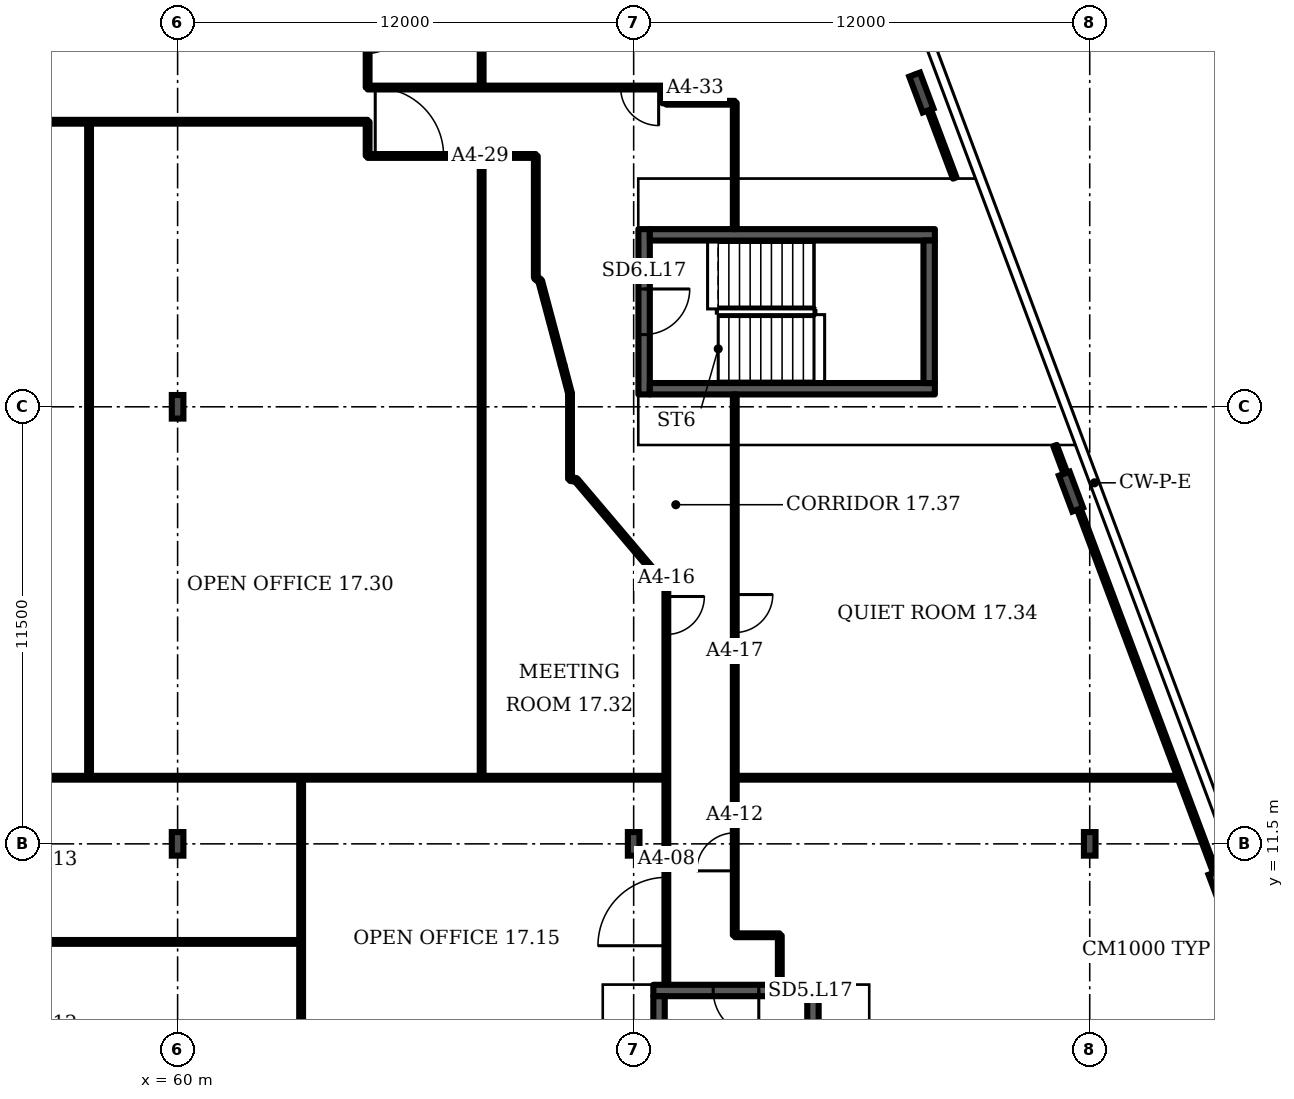
"""IFC4 building model, lengths in metres.
Left out: names, types, materials, properties, quantities, classifications, styles, units other than length and angle.
Written with IfcOpenShell. Run it as: python <this file> out.ifc"""

import sys

from ifc_helpers import new_model, si_unit, direction, frame, frame_2d, origin, origin_2d, place, context, subcontext, project, spatial, rectangle, i_section, extrude, element, fill, save


model = new_model("IFC4")
c1 = context("Model", 3, precision=1e-05, world=origin(), true_north=direction((0.0, 1.0)))
c2 = subcontext(c1, "Body", "Model", "MODEL_VIEW")
j1 = project(units=[si_unit("LENGTHUNIT", "METRE"), si_unit("PLANEANGLEUNIT", "RADIAN")], contexts=[c1])
p1 = place(None, origin())
s1 = spatial("IfcSite", under=j1, at=p1, CompositionType="ELEMENT")
p2 = place(p1, origin())
s2 = spatial("IfcBuilding", under=s1, at=p2, CompositionType="ELEMENT")
p3 = place(p2, frame((0.0, 0.0, 81.1)))
s3 = spatial("IfcBuildingStorey", under=s2, at=p3, CompositionType="ELEMENT", Elevation=81.1)
for number, where, z_axis, x_axis in (
    (1, (87.445, 10.268, 0.0), (0.0, 0.0, 1.0), (0.936, 0.351, 0.0)),
    (2, (83.507, 20.768, 0.0), (0.0, 0.0, 1.0), (0.936, 0.351, 0.0)),
    (3, (79.57, 31.268, 0.0), (0.0, 0.0, 1.0), (0.936, 0.351, 0.0)),
):
    element("IfcColumn", number, at=place(p3, frame(where, z_axis=z_axis, x_axis=x_axis)), inside=s3, PredefinedType="COLUMN", context=c2, shape_type="SweptSolid", body=[
        extrude(i_section(OverallWidth=0.302, OverallDepth=1.008, WebThickness=0.021, FlangeThickness=0.04, FilletRadius=0.03, at=origin_2d()), origin(), (0.0, 0.0, 1.0), 3.6),
    ])
for number, where, z_axis, x_axis in (
    (4, (60.0, 11.5, 0.0), (0.0, 0.0, 1.0), (1.0, 0.0, 0.0)),
    (5, (72.0, 11.5, 0.0), (0.0, 0.0, 1.0), (1.0, 0.0, 0.0)),
    (6, (84.0, 11.5, 0.0), (0.0, 0.0, 1.0), (1.0, 0.0, 0.0)),
    (7, (60.0, 23.0, 0.0), (0.0, 0.0, 1.0), (1.0, 0.0, 0.0)),
):
    element("IfcColumn", number, at=place(p3, frame(where, z_axis=z_axis, x_axis=x_axis)), inside=s3, PredefinedType="COLUMN", context=c2, shape_type="SweptSolid", body=[
        extrude(i_section(OverallWidth=0.305, OverallDepth=0.62, WebThickness=0.021, FlangeThickness=0.04, FilletRadius=0.027, at=origin_2d()), origin(), (0.0, 0.0, 1.0), 3.6),
    ])
p4 = place(p3, frame((72.518, 7.642, 0.0), z_axis=(0.0, 0.0, 1.0), x_axis=(1.0, 0.0, 0.0)))
e8 = element("IfcWall", 8, at=p4, inside=s3, PredefinedType="SHEAR", context=c2, shape_type="SweptSolid", body=[
    extrude(rectangle(XDim=4.35, YDim=0.3, at=frame_2d((2.175, 0.0))), origin(), (0.0, 0.0, 1.0), 3.2),
])
p5 = place(p4, frame((1.575, 0.0, 0.0)))
e9 = element("IfcOpeningElement", 9, at=p5, cuts=e8, PredefinedType="OPENING", context=c2, shape_type="SweptSolid", body=[
    extrude(rectangle(XDim=1.2, YDim=2.1, at=frame_2d((0.6, 1.05))), frame((0.0, 0.16, 0.0), z_axis=(0.0, -1.0, 0.0), x_axis=(1.0, 0.0, 0.0)), (0.0, 0.0, 1.0), 0.32),
])
p6 = place(p3, frame((72.275, 23.325, 0.0), z_axis=(0.0, 0.0, 1.0), x_axis=(0.0, 1.0, 0.0)))
e10 = element("IfcWall", 10, at=p6, inside=s3, PredefinedType="SHEAR", context=c2, shape_type="SweptSolid", body=[
    extrude(rectangle(XDim=4.35, YDim=0.3, at=frame_2d((2.175, 0.0))), origin(), (0.0, 0.0, 1.0), 3.2),
])
p7 = place(p6, frame((1.575, 0.0, 0.0)))
e11 = element("IfcOpeningElement", 11, at=p7, cuts=e10, PredefinedType="OPENING", context=c2, shape_type="SweptSolid", body=[
    extrude(rectangle(XDim=1.2, YDim=2.1, at=frame_2d((0.6, 1.05))), frame((0.0, 0.16, 0.0), z_axis=(0.0, -1.0, 0.0), x_axis=(1.0, 0.0, 0.0)), (0.0, 0.0, 1.0), 0.32),
])
p8 = place(p3, frame((45.3, 8.92, 0.0), z_axis=(0.0, 0.0, 1.0), x_axis=(1.0, 0.0, 0.0)))
e12 = element("IfcWall", 12, at=p8, inside=s3, PredefinedType="PARTITIONING", context=c2, shape_type="SweptSolid", body=[
    extrude(rectangle(XDim=17.95, YDim=0.1, at=frame_2d((8.975, 0.0))), origin(), (0.0, 0.0, 1.0), 3.2),
])
p9 = place(p3, frame((45.3, 13.24, 0.0), z_axis=(0.0, 0.0, 1.0), x_axis=(1.0, 0.0, 0.0)))
e13 = element("IfcWall", 13, at=p9, inside=s3, PredefinedType="PARTITIONING", context=c2, shape_type="SweptSolid", body=[
    extrude(rectangle(XDim=27.56, YDim=0.1, at=frame_2d((13.78, 0.0))), origin(), (0.0, 0.0, 1.0), 3.2),
])
p10 = place(p3, frame((45.3, 30.5, 0.0), z_axis=(0.0, 0.0, 1.0), x_axis=(1.0, 0.0, 0.0)))
e14 = element("IfcWall", 14, at=p10, inside=s3, PredefinedType="PARTITIONING", context=c2, shape_type="SweptSolid", body=[
    extrude(rectangle(XDim=19.7, YDim=0.1, at=frame_2d((9.85, 0.0))), origin(), (0.0, 0.0, 1.0), 3.2),
])
p11 = place(p3, frame((57.67, 13.24, 0.0), z_axis=(0.0, 0.0, 1.0), x_axis=(0.0, 1.0, 0.0)))
e15 = element("IfcWall", 15, at=p11, inside=s3, PredefinedType="PARTITIONING", context=c2, shape_type="SweptSolid", body=[
    extrude(rectangle(XDim=17.26, YDim=0.1, at=frame_2d((8.63, 0.0))), origin(), (0.0, 0.0, 1.0), 3.2),
])
p12 = place(p3, frame((63.25, -2.495, 0.0), z_axis=(0.0, 0.0, 1.0), x_axis=(0.0, 1.0, 0.0)))
e16 = element("IfcWall", 16, at=p12, inside=s3, PredefinedType="PARTITIONING", context=c2, shape_type="SweptSolid", body=[
    extrude(rectangle(XDim=15.735, YDim=0.1, at=frame_2d((7.868, 0.0))), origin(), (0.0, 0.0, 1.0), 2.58),
])
p13 = place(p3, frame((65.0, 29.6, 0.0), z_axis=(0.0, 0.0, 1.0), x_axis=(0.0, 1.0, 0.0)))
e17 = element("IfcWall", 17, at=p13, inside=s3, PredefinedType="PARTITIONING", context=c2, shape_type="SweptSolid", body=[
    extrude(rectangle(XDim=0.9, YDim=0.1, at=frame_2d((0.45, 0.0))), origin(), (0.0, 0.0, 1.0), 3.2),
])
p14 = place(p3, frame((65.0, 29.6, 0.0), z_axis=(0.0, 0.0, 1.0), x_axis=(1.0, 0.0, 0.0)))
e18 = element("IfcWall", 18, at=p14, inside=s3, PredefinedType="PARTITIONING", context=c2, shape_type="SweptSolid", body=[
    extrude(rectangle(XDim=4.425, YDim=0.1, at=frame_2d((2.212, 0.0))), origin(), (0.0, 0.0, 1.0), 3.2),
])
p15 = place(p14, frame((0.2, 0.0, 0.0)))
e19 = element("IfcOpeningElement", 19, at=p15, cuts=e18, PredefinedType="OPENING", context=c2, shape_type="SweptSolid", body=[
    extrude(rectangle(XDim=1.8, YDim=2.1, at=frame_2d((0.9, 1.05))), frame((0.0, 0.06, 0.0), z_axis=(0.0, -1.0, 0.0), x_axis=(1.0, 0.0, 0.0)), (0.0, 0.0, 1.0), 0.12),
])
p16 = place(p3, frame((65.0, 31.4, 0.0), z_axis=(0.0, 0.0, 1.0), x_axis=(0.0, 1.0, 0.0)))
e20 = element("IfcWall", 20, at=p16, inside=s3, PredefinedType="PARTITIONING", context=c2, shape_type="SweptSolid", body=[
    extrude(rectangle(XDim=2.58, YDim=0.1, at=frame_2d((1.29, 0.0))), origin(), (0.0, 0.0, 1.0), 3.2),
])
p17 = place(p16, frame((0.9, 0.0, 0.0)))
e21 = element("IfcOpeningElement", 21, at=p17, cuts=e20, PredefinedType="OPENING", context=c2, shape_type="SweptSolid", body=[
    extrude(rectangle(XDim=1.0, YDim=2.1, at=frame_2d((0.5, 1.05))), frame((0.0, 0.06, 0.0), z_axis=(0.0, -1.0, 0.0), x_axis=(1.0, 0.0, 0.0)), (0.0, 0.0, 1.0), 0.12),
])
p18 = place(p3, frame((65.0, 31.4, 0.0), z_axis=(0.0, 0.0, 1.0), x_axis=(1.0, 0.0, 0.0)))
e22 = element("IfcWall", 22, at=p18, inside=s3, PredefinedType="PARTITIONING", context=c2, shape_type="SweptSolid", body=[
    extrude(rectangle(XDim=7.81, YDim=0.1, at=frame_2d((3.905, 0.0))), origin(), (0.0, 0.0, 1.0), 3.2),
])
p19 = place(p18, frame((6.657, 0.0, 0.0)))
e23 = element("IfcOpeningElement", 23, at=p19, cuts=e22, PredefinedType="OPENING", context=c2, shape_type="SweptSolid", body=[
    extrude(rectangle(XDim=1.0, YDim=2.1, at=frame_2d((0.5, 1.05))), frame((0.0, 0.06, 0.0), z_axis=(0.0, -1.0, 0.0), x_axis=(1.0, 0.0, 0.0)), (0.0, 0.0, 1.0), 0.12),
])
p20 = place(p3, frame((68.0, 13.24, 0.0), z_axis=(0.0, 0.0, 1.0), x_axis=(0.0, 1.0, 0.0)))
e24 = element("IfcWall", 24, at=p20, inside=s3, PredefinedType="PARTITIONING", context=c2, shape_type="SweptSolid", body=[
    extrude(rectangle(XDim=16.36, YDim=0.1, at=frame_2d((8.18, 0.0))), origin(), (0.0, 0.0, 1.0), 3.2),
])
p21 = place(p3, frame((68.0, 31.4, 0.0), z_axis=(0.0, 0.0, 1.0), x_axis=(0.0, 1.0, 0.0)))
e25 = element("IfcWall", 25, at=p21, inside=s3, PredefinedType="PARTITIONING", context=c2, shape_type="SweptSolid", body=[
    extrude(rectangle(XDim=8.39, YDim=0.1, at=frame_2d((4.195, 0.0))), origin(), (0.0, 0.0, 1.0), 3.2),
])
p22 = place(p3, frame((69.425, 26.4, 0.0), z_axis=(0.0, 0.0, 1.0), x_axis=(0.0, 1.0, 0.0)))
e26 = element("IfcWall", 26, at=p22, inside=s3, PredefinedType="PARTITIONING", context=c2, shape_type="SweptSolid", body=[
    extrude(rectangle(XDim=3.2, YDim=0.1, at=frame_2d((1.6, 0.0))), origin(), (0.0, 0.0, 1.0), 3.2),
])
p23 = place(p3, frame((69.54, 26.31, 0.0), z_axis=(0.0, 0.0, 1.0), x_axis=(-0.787997, 0.615675, 0.0)))
e27 = element("IfcWall", 27, at=p23, inside=s3, PredefinedType="PARTITIONING", context=c2, shape_type="SweptSolid", body=[
    extrude(rectangle(XDim=0.146, YDim=0.1, at=frame_2d((0.073, 0.0))), origin(), (0.0, 0.0, 1.0), 3.2),
])
p24 = place(p3, frame((70.13, 24.095, 0.0), z_axis=(0.0, 0.0, 1.0), x_axis=(-0.257318, 0.966327, 0.0)))
e28 = element("IfcWall", 28, at=p24, inside=s3, PredefinedType="PARTITIONING", context=c2, shape_type="SweptSolid", body=[
    extrude(rectangle(XDim=2.292, YDim=0.1, at=frame_2d((1.146, 0.0))), origin(), (0.0, 0.0, 1.0), 3.2),
])
p25 = place(p3, frame((70.325, 21.1, 0.0), z_axis=(0.0, 0.0, 1.0), x_axis=(0.0, 1.0, 0.0)))
e29 = element("IfcWall", 29, at=p25, inside=s3, PredefinedType="PARTITIONING", context=c2, shape_type="SweptSolid", body=[
    extrude(rectangle(XDim=2.255, YDim=0.1, at=frame_2d((1.127, 0.0))), origin(), (0.0, 0.0, 1.0), 3.2),
])
p26 = place(p3, frame((70.325, 23.355, 0.0), z_axis=(0.0, 0.0, 1.0), x_axis=(-0.254901, 0.966965, 0.0)))
e30 = element("IfcWall", 30, at=p26, inside=s3, PredefinedType="PARTITIONING", context=c2, shape_type="SweptSolid", body=[
    extrude(rectangle(XDim=0.765, YDim=0.1, at=frame_2d((0.383, 0.0))), origin(), (0.0, 0.0, 1.0), 3.2),
])
p27 = place(p3, frame((70.485, 21.075, 0.0), z_axis=(0.0, 0.0, 1.0), x_axis=(-0.987098, 0.160112, 0.0)))
e31 = element("IfcWall", 31, at=p27, inside=s3, PredefinedType="PARTITIONING", context=c2, shape_type="SweptSolid", body=[
    extrude(rectangle(XDim=0.157, YDim=0.1, at=frame_2d((0.079, 0.0))), origin(), (0.0, 0.0, 1.0), 3.2),
])
p28 = place(p3, frame((72.81, 30.985, 0.0), z_axis=(0.0, 0.0, 1.0), x_axis=(0.0, 1.0, 0.0)))
e32 = element("IfcWall", 32, at=p28, inside=s3, PredefinedType="PARTITIONING", context=c2, shape_type="SweptSolid", body=[
    extrude(rectangle(XDim=0.415, YDim=0.1, at=frame_2d((0.208, 0.0))), origin(), (0.0, 0.0, 1.0), 3.2),
])
p29 = place(p3, frame((72.86, 7.812, 0.0), z_axis=(0.0, 0.0, 1.0), x_axis=(0.0, 1.0, 0.0)))
e33 = element("IfcWall", 33, at=p29, inside=s3, PredefinedType="PARTITIONING", context=c2, shape_type="SweptSolid", body=[
    extrude(rectangle(XDim=10.463, YDim=0.1, at=frame_2d((5.231, 0.0))), origin(), (0.0, 0.0, 1.0), 3.2),
])
p30 = place(p29, frame((1.008, 0.0, 0.0)))
e34 = element("IfcOpeningElement", 34, at=p30, cuts=e33, PredefinedType="OPENING", context=c2, shape_type="SweptSolid", body=[
    extrude(rectangle(XDim=1.8, YDim=2.1, at=frame_2d((0.9, 1.05))), frame((0.0, 0.06, 0.0), z_axis=(0.0, -1.0, 0.0), x_axis=(1.0, 0.0, 0.0)), (0.0, 0.0, 1.0), 0.12),
])
p31 = place(p29, frame((9.197, 0.0, 0.0)))
e35 = element("IfcOpeningElement", 35, at=p31, cuts=e33, PredefinedType="OPENING", context=c2, shape_type="SweptSolid", body=[
    extrude(rectangle(XDim=1.0, YDim=2.1, at=frame_2d((0.5, 1.05))), frame((0.0, 0.06, 0.0), z_axis=(0.0, -1.0, 0.0), x_axis=(1.0, 0.0, 0.0)), (0.0, 0.0, 1.0), 0.12),
])
p32 = place(p3, frame((72.86, 31.0, 0.0), z_axis=(0.0, 0.0, 1.0), x_axis=(1.0, 0.0, 0.0)))
e36 = element("IfcWall", 36, at=p32, inside=s3, PredefinedType="PARTITIONING", context=c2, shape_type="SweptSolid", body=[
    extrude(rectangle(XDim=1.8, YDim=0.1, at=frame_2d((0.9, 0.0))), origin(), (0.0, 0.0, 1.0), 3.2),
])
p33 = place(p3, frame((72.86, 18.275, 0.0), z_axis=(0.0, 0.0, 1.0), x_axis=(-0.646848, 0.762613, 0.0)))
e37 = element("IfcWall", 37, at=p33, inside=s3, PredefinedType="PARTITIONING", context=c2, shape_type="SweptSolid", body=[
    extrude(rectangle(XDim=3.672, YDim=0.1, at=frame_2d((1.836, 0.0))), origin(), (0.0, 0.0, 1.0), 3.2),
])
p34 = place(p3, frame((74.66, 9.095, 0.0), z_axis=(0.0, 0.0, 1.0), x_axis=(0.0, 1.0, 0.0)))
e38 = element("IfcWall", 38, at=p34, inside=s3, PredefinedType="PARTITIONING", context=c2, shape_type="SweptSolid", body=[
    extrude(rectangle(XDim=14.23, YDim=0.1, at=frame_2d((7.115, 0.0))), origin(), (0.0, 0.0, 1.0), 3.2),
])
p35 = place(p34, frame((1.695, 0.0, 0.0)))
e39 = element("IfcOpeningElement", 39, at=p35, cuts=e38, PredefinedType="OPENING", context=c2, shape_type="SweptSolid", body=[
    extrude(rectangle(XDim=1.0, YDim=2.1, at=frame_2d((0.5, 1.05))), frame((0.0, 0.06, 0.0), z_axis=(0.0, -1.0, 0.0), x_axis=(1.0, 0.0, 0.0)), (0.0, 0.0, 1.0), 0.12),
])
p36 = place(p34, frame((7.965, 0.0, 0.0)))
e40 = element("IfcOpeningElement", 40, at=p36, cuts=e38, PredefinedType="OPENING", context=c2, shape_type="SweptSolid", body=[
    extrude(rectangle(XDim=1.0, YDim=2.1, at=frame_2d((0.5, 1.05))), frame((0.0, 0.06, 0.0), z_axis=(0.0, -1.0, 0.0), x_axis=(1.0, 0.0, 0.0)), (0.0, 0.0, 1.0), 0.12),
])
p37 = place(p3, frame((74.66, 27.675, 0.0), z_axis=(0.0, 0.0, 1.0), x_axis=(0.0, 1.0, 0.0)))
e41 = element("IfcWall", 41, at=p37, inside=s3, PredefinedType="PARTITIONING", context=c2, shape_type="SweptSolid", body=[
    extrude(rectangle(XDim=3.325, YDim=0.1, at=frame_2d((1.663, 0.0))), origin(), (0.0, 0.0, 1.0), 3.2),
])
p38 = place(p3, frame((74.665, 9.095, 0.0), z_axis=(0.0, 0.0, 1.0), x_axis=(1.0, 0.0, 0.0)))
e42 = element("IfcWall", 42, at=p38, inside=s3, PredefinedType="PARTITIONING", context=c2, shape_type="SweptSolid", body=[
    extrude(rectangle(XDim=1.175, YDim=0.1, at=frame_2d((0.587, 0.0))), origin(), (0.0, 0.0, 1.0), 3.2),
])
p39 = place(p3, frame((74.665, 13.24, 0.0), z_axis=(0.0, 0.0, 1.0), x_axis=(1.0, 0.0, 0.0)))
e43 = element("IfcWall", 43, at=p39, inside=s3, PredefinedType="PARTITIONING", context=c2, shape_type="SweptSolid", body=[
    extrude(rectangle(XDim=11.7, YDim=0.1, at=frame_2d((5.85, 0.0))), origin(), (0.0, 0.0, 1.0), 3.2),
])
p40 = place(p3, frame((75.845, 7.812, 0.0), z_axis=(0.0, 0.0, 1.0), x_axis=(0.0, 1.0, 0.0)))
e44 = element("IfcWall", 44, at=p40, inside=s3, PredefinedType="PARTITIONING", context=c2, shape_type="SweptSolid", body=[
    extrude(rectangle(XDim=1.278, YDim=0.1, at=frame_2d((0.639, 0.0))), origin(), (0.0, 0.0, 1.0), 3.2),
])
p41 = place(p3, frame((80.448, 29.02, 0.0), z_axis=(0.0, 0.0, 1.0), x_axis=(-0.35129, 0.93627, 0.0)))
e45 = element("IfcWall", 45, at=p41, inside=s3, PredefinedType="PARTITIONING", context=c2, shape_type="SweptSolid", body=[
    extrude(rectangle(XDim=2.911, YDim=0.1, at=frame_2d((1.455, 0.0))), origin(), (0.0, 0.0, 1.0), 2.58),
])
p42 = place(p3, frame((87.65, 9.81, 0.0), z_axis=(0.0, 0.0, 1.0), x_axis=(-0.35104, 0.936357, 0.0)))
e46 = element("IfcWall", 46, at=p42, inside=s3, PredefinedType="PARTITIONING", context=c2, shape_type="SweptSolid", body=[
    extrude(rectangle(XDim=12.997, YDim=0.1, at=frame_2d((6.499, 0.0))), origin(), (0.0, 0.0, 1.0), 2.58),
])
for number, where, z_axis, x_axis in (
    (47, (72.667, -0.008, 0.0), (0.0, 0.0, 1.0), (0.0, 1.0, 0.0)),
    (48, (76.718, -0.008, 0.0), (0.0, 0.0, 1.0), (0.0, 1.0, 0.0)),
    (49, (72.425, 23.475, 0.0), (0.0, 0.0, 1.0), (1.0, 0.0, 0.0)),
    (50, (72.425, 27.525, 0.0), (0.0, 0.0, 1.0), (1.0, 0.0, 0.0)),
):
    element("IfcWall", number, at=place(p3, frame(where, z_axis=z_axis, x_axis=x_axis)), inside=s3, PredefinedType="SHEAR", context=c2, shape_type="SweptSolid", body=[
        extrude(rectangle(XDim=7.5, YDim=0.3, at=frame_2d((3.75, 0.0))), origin(), (0.0, 0.0, 1.0), 3.2),
    ])
p43 = place(p3, frame((79.775, 23.625, 0.0), z_axis=(0.0, 0.0, 1.0), x_axis=(0.0, 1.0, 0.0)))
e51 = element("IfcWall", 51, at=p43, inside=s3, PredefinedType="SHEAR", context=c2, shape_type="SweptSolid", body=[
    extrude(rectangle(XDim=3.75, YDim=0.3, at=frame_2d((1.875, 0.0))), origin(), (0.0, 0.0, 1.0), 3.2),
])
p44 = place(p5, origin())
e52 = element("IfcDoor", 52, at=p44, inside=s3, OperationType="SINGLE_SWING_RIGHT", PredefinedType="DOOR", context=c2, shape_type="SweptSolid", body=[
    extrude(rectangle(XDim=1.2, YDim=2.1, at=frame_2d((0.6, 1.05))), frame((0.0, 0.025, 0.0), z_axis=(0.0, -1.0, 0.0), x_axis=(1.0, 0.0, 0.0)), (0.0, 0.0, 1.0), 0.05),
])
fill(e9, e52)
p45 = place(p7, origin())
e53 = element("IfcDoor", 53, at=p45, inside=s3, OperationType="SINGLE_SWING_RIGHT", PredefinedType="DOOR", context=c2, shape_type="SweptSolid", body=[
    extrude(rectangle(XDim=1.2, YDim=2.1, at=frame_2d((0.6, 1.05))), frame((0.0, 0.025, 0.0), z_axis=(0.0, -1.0, 0.0), x_axis=(1.0, 0.0, 0.0)), (0.0, 0.0, 1.0), 0.05),
])
fill(e11, e53)
p46 = place(p30, origin())
e54 = element("IfcDoor", 54, at=p46, inside=s3, OperationType="DOUBLE_DOOR_SINGLE_SWING", PredefinedType="DOOR", context=c2, shape_type="SweptSolid", body=[
    extrude(rectangle(XDim=1.8, YDim=2.1, at=frame_2d((0.9, 1.05))), frame((0.0, 0.025, 0.0), z_axis=(0.0, -1.0, 0.0), x_axis=(1.0, 0.0, 0.0)), (0.0, 0.0, 1.0), 0.05),
])
fill(e34, e54)
p47 = place(p35, origin())
e55 = element("IfcDoor", 55, at=p47, inside=s3, OperationType="SINGLE_SWING_LEFT", PredefinedType="DOOR", context=c2, shape_type="SweptSolid", body=[
    extrude(rectangle(XDim=1.0, YDim=2.1, at=frame_2d((0.5, 1.05))), frame((0.0, 0.025, 0.0), z_axis=(0.0, -1.0, 0.0), x_axis=(1.0, 0.0, 0.0)), (0.0, 0.0, 1.0), 0.05),
])
fill(e39, e55)
p48 = place(p31, origin())
e56 = element("IfcDoor", 56, at=p48, inside=s3, OperationType="SINGLE_SWING_RIGHT", PredefinedType="DOOR", context=c2, shape_type="SweptSolid", body=[
    extrude(rectangle(XDim=1.0, YDim=2.1, at=frame_2d((0.5, 1.05))), frame((0.0, 0.025, 0.0), z_axis=(0.0, -1.0, 0.0), x_axis=(1.0, 0.0, 0.0)), (0.0, 0.0, 1.0), 0.05),
])
fill(e35, e56)
p49 = place(p36, origin())
e57 = element("IfcDoor", 57, at=p49, inside=s3, OperationType="SINGLE_SWING_RIGHT", PredefinedType="DOOR", context=c2, shape_type="SweptSolid", body=[
    extrude(rectangle(XDim=1.0, YDim=2.1, at=frame_2d((0.5, 1.05))), frame((0.0, 0.025, 0.0), z_axis=(0.0, -1.0, 0.0), x_axis=(1.0, 0.0, 0.0)), (0.0, 0.0, 1.0), 0.05),
])
fill(e40, e57)
p50 = place(p15, origin())
e58 = element("IfcDoor", 58, at=p50, inside=s3, OperationType="DOUBLE_DOOR_SINGLE_SWING", PredefinedType="DOOR", context=c2, shape_type="SweptSolid", body=[
    extrude(rectangle(XDim=1.8, YDim=2.1, at=frame_2d((0.9, 1.05))), frame((0.0, 0.025, 0.0), z_axis=(0.0, -1.0, 0.0), x_axis=(1.0, 0.0, 0.0)), (0.0, 0.0, 1.0), 0.05),
])
fill(e19, e58)
p51 = place(p19, origin())
e59 = element("IfcDoor", 59, at=p51, inside=s3, OperationType="SINGLE_SWING_RIGHT", PredefinedType="DOOR", context=c2, shape_type="SweptSolid", body=[
    extrude(rectangle(XDim=1.0, YDim=2.1, at=frame_2d((0.5, 1.05))), frame((0.0, 0.025, 0.0), z_axis=(0.0, -1.0, 0.0), x_axis=(1.0, 0.0, 0.0)), (0.0, 0.0, 1.0), 0.05),
])
fill(e23, e59)
p52 = place(p17, origin())
e60 = element("IfcDoor", 60, at=p52, inside=s3, OperationType="SINGLE_SWING_RIGHT", PredefinedType="DOOR", context=c2, shape_type="SweptSolid", body=[
    extrude(rectangle(XDim=1.0, YDim=2.1, at=frame_2d((0.5, 1.05))), frame((0.0, 0.025, 0.0), z_axis=(0.0, -1.0, 0.0), x_axis=(1.0, 0.0, 0.0)), (0.0, 0.0, 1.0), 0.05),
])
fill(e21, e60)
save(model, sys.argv[1])
